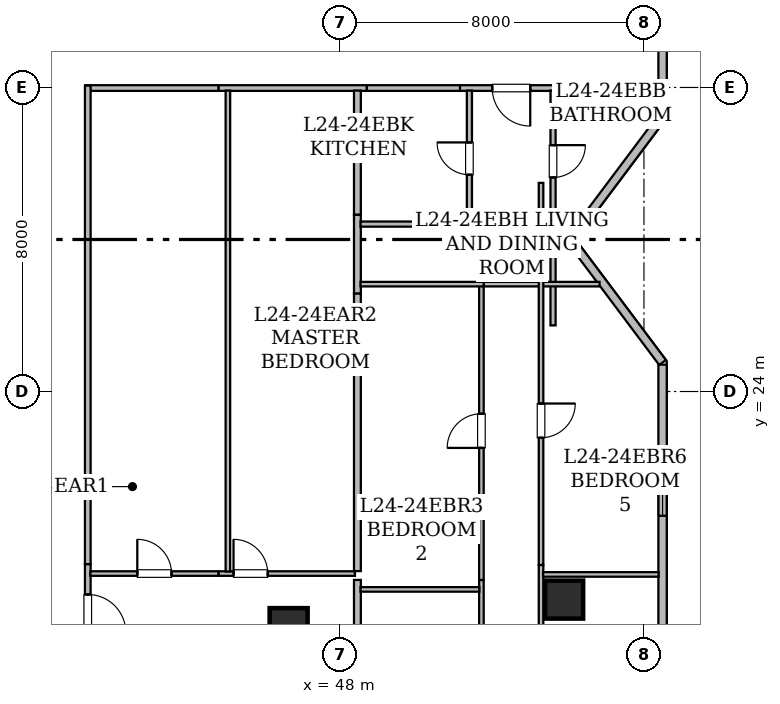
"""IFC4 building model, lengths in metres.
Left out: names, types, materials, properties, quantities, classifications, styles, units other than length and angle.
Written with IfcOpenShell. Run it as: python <this file> out.ifc"""

import sys

from ifc_helpers import new_model, si_unit, direction, frame, frame_2d, origin, origin_2d, place, context, subcontext, project, spatial, rectangle, hollow_rectangle, extrude, element, fill, save


model = new_model("IFC4")
c1 = context("Model", 3, precision=1e-05, world=origin(), true_north=direction((0.0, 1.0)))
c2 = subcontext(c1, "Body", "Model", "MODEL_VIEW")
j1 = project(units=[si_unit("LENGTHUNIT", "METRE"), si_unit("PLANEANGLEUNIT", "RADIAN")], contexts=[c1])
p1 = place(None, origin())
s1 = spatial("IfcSite", under=j1, at=p1, CompositionType="ELEMENT")
p2 = place(p1, origin())
s2 = spatial("IfcBuilding", under=s1, at=p2, CompositionType="ELEMENT")
p3 = place(p2, frame((0.0, 0.0, 98.25)))
s3 = spatial("IfcBuildingStorey", under=s2, at=p3, CompositionType="ELEMENT", Elevation=98.25)
for number, where, z_axis, x_axis in (
    (1, (53.9, 18.525, 0.0), (0.0, 0.0, 1.0), (1.0, 0.0, 0.0)),
    (2, (46.65, 17.8, 0.0), (0.0, 0.0, 1.0), (1.0, 0.0, 0.0)),
):
    element("IfcColumn", number, at=place(p3, frame(where, z_axis=z_axis, x_axis=x_axis)), inside=s3, PredefinedType="COLUMN", context=c2, shape_type="SweptSolid", body=[
        extrude(hollow_rectangle(XDim=1.0, YDim=1.0, WallThickness=0.05, at=origin_2d()), origin(), (0.0, 0.0, 1.0), 3.65),
    ])
p4 = place(p3, frame((56.49, 45.283, 0.0), z_axis=(0.0, 0.0, 1.0), x_axis=(0.0, -1.0, 0.0)))
e3 = element("IfcWall", 3, at=p4, inside=s3, PredefinedType="STANDARD", context=c2, shape_type="SweptSolid", body=[
    extrude(rectangle(XDim=14.046, YDim=0.22, at=frame_2d((7.023, 0.0))), origin(), (0.0, 0.0, 1.0), 3.43),
])
p5 = place(p4, frame((6.429, 0.0, 0.8)))
e4 = element("IfcOpeningElement", 4, at=p5, cuts=e3, PredefinedType="OPENING", context=c2, shape_type="SweptSolid", body=[
    extrude(rectangle(XDim=1.2, YDim=1.5, at=frame_2d((0.6, 0.75))), frame((0.0, 0.12, 0.0), z_axis=(0.0, -1.0, 0.0), x_axis=(1.0, 0.0, 0.0)), (0.0, 0.0, 1.0), 0.24),
])
p6 = place(p4, frame((2.971, 0.0, 0.85)))
e5 = element("IfcOpeningElement", 5, at=p6, cuts=e3, PredefinedType="OPENING", context=c2, shape_type="SweptSolid", body=[
    extrude(rectangle(XDim=1.65, YDim=1.55, at=frame_2d((0.825, 0.775))), frame((0.0, 0.12, 0.0), z_axis=(0.0, -1.0, 0.0), x_axis=(1.0, 0.0, 0.0)), (0.0, 0.0, 1.0), 0.24),
])
p7 = place(p3, frame((56.456, 31.191, 0.0), z_axis=(0.0, 0.0, 1.0), x_axis=(-0.600137081448, -0.799897170561, 0.0)))
e6 = element("IfcWall", 6, at=p7, inside=s3, PredefinedType="STANDARD", context=c2, shape_type="SweptSolid", body=[
    extrude(rectangle(XDim=3.989, YDim=0.22, at=frame_2d((1.995, 0.0))), origin(), (0.0, 0.0, 1.0), 3.43),
])
p8 = place(p3, frame((54.119, 27.924, 0.0), z_axis=(0.0, 0.0, 1.0), x_axis=(0.600039540588, -0.799970343032, 0.0)))
e7 = element("IfcWall", 7, at=p8, inside=s3, PredefinedType="STANDARD", context=c2, shape_type="SweptSolid", body=[
    extrude(rectangle(XDim=3.952, YDim=0.22, at=frame_2d((1.976, 0.0))), origin(), (0.0, 0.0, 1.0), 3.43),
])
p9 = place(p3, frame((56.49, 24.707, 0.0), z_axis=(0.0, 0.0, 1.0), x_axis=(0.0, -1.0, 0.0)))
e8 = element("IfcWall", 8, at=p9, inside=s3, PredefinedType="STANDARD", context=c2, shape_type="SweptSolid", body=[
    extrude(rectangle(XDim=14.061, YDim=0.22, at=frame_2d((7.031, 0.0))), origin(), (0.0, 0.0, 1.0), 3.43),
])
p10 = place(p9, frame((12.356, 0.0, 0.85)))
e9 = element("IfcOpeningElement", 9, at=p10, cuts=e8, PredefinedType="OPENING", context=c2, shape_type="SweptSolid", body=[
    extrude(rectangle(XDim=1.5, YDim=1.6, at=frame_2d((0.75, 0.8))), frame((0.0, 0.12, 0.0), z_axis=(0.0, -1.0, 0.0), x_axis=(1.0, 0.0, 0.0)), (0.0, 0.0, 1.0), 0.24),
])
p11 = place(p9, frame((7.902, 0.0, 0.85)))
e10 = element("IfcOpeningElement", 10, at=p11, cuts=e8, PredefinedType="OPENING", context=c2, shape_type="SweptSolid", body=[
    extrude(rectangle(XDim=1.65, YDim=1.55, at=frame_2d((0.825, 0.775))), frame((0.0, 0.12, 0.0), z_axis=(0.0, -1.0, 0.0), x_axis=(1.0, 0.0, 0.0)), (0.0, 0.0, 1.0), 0.24),
])
p12 = place(p9, frame((2.327, 0.0, 0.85)))
e11 = element("IfcOpeningElement", 11, at=p12, cuts=e8, PredefinedType="OPENING", context=c2, shape_type="SweptSolid", body=[
    extrude(rectangle(XDim=1.65, YDim=1.55, at=frame_2d((0.825, 0.775))), frame((0.0, 0.12, 0.0), z_axis=(0.0, -1.0, 0.0), x_axis=(1.0, 0.0, 0.0)), (0.0, 0.0, 1.0), 0.24),
])
p13 = place(p3, frame((41.365, 19.459, 0.0), z_axis=(0.0, 0.0, 1.0), x_axis=(0.0, -1.0, 0.0)))
e12 = element("IfcWall", 12, at=p13, inside=s3, PredefinedType="STANDARD", context=c2, shape_type="SweptSolid", body=[
    extrude(rectangle(XDim=2.559, YDim=0.15, at=frame_2d((1.28, 0.0))), origin(), (0.0, 0.0, 1.0), 2.647),
])
p14 = place(p13, frame((0.8, 0.0, 0.0)))
e13 = element("IfcOpeningElement", 13, at=p14, cuts=e12, PredefinedType="OPENING", context=c2, shape_type="SweptSolid", body=[
    extrude(rectangle(XDim=1.0, YDim=2.15, at=frame_2d((0.5, 1.075))), frame((0.0, 0.085, 0.0), z_axis=(0.0, -1.0, 0.0), x_axis=(1.0, 0.0, 0.0)), (0.0, 0.0, 1.0), 0.17),
])
p15 = place(p3, frame((48.709, 31.985, 0.0), z_axis=(0.0, 0.0, 1.0), x_axis=(-1.0, 0.0, 0.0)))
e14 = element("IfcWall", 14, at=p15, inside=s3, PredefinedType="STANDARD", context=c2, shape_type="SweptSolid", body=[
    extrude(rectangle(XDim=3.906, YDim=0.15, at=frame_2d((1.953, 0.0))), origin(), (0.0, 0.0, 1.0), 2.647),
])
p16 = place(p3, frame((44.803, 31.985, 0.0), z_axis=(0.0, 0.0, 1.0), x_axis=(-1.0, 0.0, 0.0)))
e15 = element("IfcWall", 15, at=p16, inside=s3, PredefinedType="STANDARD", context=c2, shape_type="SweptSolid", body=[
    extrude(rectangle(XDim=3.503, YDim=0.15, at=frame_2d((1.751, 0.0))), origin(), (0.0, 0.0, 1.0), 3.43),
])
p17 = place(p3, frame((41.365, 32.048, 0.0), z_axis=(0.0, 0.0, 1.0), x_axis=(0.0, -1.0, 0.0)))
e16 = element("IfcWall", 16, at=p17, inside=s3, PredefinedType="STANDARD", context=c2, shape_type="SweptSolid", body=[
    extrude(rectangle(XDim=12.589, YDim=0.15, at=frame_2d((6.294, 0.0))), origin(), (0.0, 0.0, 1.0), 2.961),
])
p18 = place(p3, frame((53.857, 31.985, 0.0), z_axis=(0.0, 0.0, 1.0), x_axis=(-1.0, 0.0, 0.0)))
e17 = element("IfcWall", 17, at=p18, inside=s3, PredefinedType="STANDARD", context=c2, shape_type="SweptSolid", body=[
    extrude(rectangle(XDim=2.699, YDim=0.15, at=frame_2d((1.35, 0.0))), origin(), (0.0, 0.0, 1.0), 2.876),
])
p19 = place(p18, frame((0.849, 0.0, 0.0)))
e18 = element("IfcOpeningElement", 18, at=p19, cuts=e17, PredefinedType="OPENING", context=c2, shape_type="SweptSolid", body=[
    extrude(rectangle(XDim=1.0, YDim=2.15, at=frame_2d((0.5, 1.075))), frame((0.0, 0.085, 0.0), z_axis=(0.0, -1.0, 0.0), x_axis=(1.0, 0.0, 0.0)), (0.0, 0.0, 1.0), 0.17),
])
p20 = place(p3, frame((56.388, 31.985, 0.0), z_axis=(0.0, 0.0, 1.0), x_axis=(-1.0, 0.0, 0.0)))
e19 = element("IfcWall", 19, at=p20, inside=s3, PredefinedType="STANDARD", context=c2, shape_type="SweptSolid", body=[
    extrude(rectangle(XDim=2.531, YDim=0.15, at=frame_2d((1.266, 0.0))), origin(), (0.0, 0.0, 1.0), 2.876),
])
p21 = place(p3, frame((51.158, 31.985, 0.0), z_axis=(0.0, 0.0, 1.0), x_axis=(-1.0, 0.0, 0.0)))
e20 = element("IfcWall", 20, at=p21, inside=s3, PredefinedType="STANDARD", context=c2, shape_type="SweptSolid", body=[
    extrude(rectangle(XDim=2.449, YDim=0.15, at=frame_2d((1.225, 0.0))), origin(), (0.0, 0.0, 1.0), 3.43),
])
p22 = place(p3, frame((44.803, 19.21, 0.0), z_axis=(0.0, 0.0, 1.0), x_axis=(1.0, 0.0, 0.0)))
e21 = element("IfcWall", 21, at=p22, inside=s3, PredefinedType="PARTITIONING", context=c2, shape_type="SweptSolid", body=[
    extrude(rectangle(XDim=3.592, YDim=0.12, at=frame_2d((1.796, 0.0))), origin(), (0.0, 0.0, 1.0), 2.647),
])
p23 = place(p22, frame((0.397, 0.0, 0.0)))
e22 = element("IfcOpeningElement", 22, at=p23, cuts=e21, PredefinedType="OPENING", context=c2, shape_type="SweptSolid", body=[
    extrude(rectangle(XDim=0.9, YDim=2.1, at=frame_2d((0.45, 1.05))), frame((0.0, 0.07, 0.0), z_axis=(0.0, -1.0, 0.0), x_axis=(1.0, 0.0, 0.0)), (0.0, 0.0, 1.0), 0.14),
])
p24 = place(p3, frame((41.432, 19.21, 0.0), z_axis=(0.0, 0.0, 1.0), x_axis=(1.0, 0.0, 0.0)))
e23 = element("IfcWall", 23, at=p24, inside=s3, PredefinedType="PARTITIONING", context=c2, shape_type="SweptSolid", body=[
    extrude(rectangle(XDim=3.371, YDim=0.12, at=frame_2d((1.686, 0.0))), origin(), (0.0, 0.0, 1.0), 3.43),
])
p25 = place(p24, frame((1.236, 0.0, 0.0)))
e24 = element("IfcOpeningElement", 24, at=p25, cuts=e23, PredefinedType="OPENING", context=c2, shape_type="SweptSolid", body=[
    extrude(rectangle(XDim=0.9, YDim=2.1, at=frame_2d((0.45, 1.05))), frame((0.0, 0.07, 0.0), z_axis=(0.0, -1.0, 0.0), x_axis=(1.0, 0.0, 0.0)), (0.0, 0.0, 1.0), 0.14),
])
p26 = place(p3, frame((48.46, 19.042, 0.0), z_axis=(0.0, 0.0, 1.0), x_axis=(0.0, -1.0, 0.0)))
e25 = element("IfcWall", 25, at=p26, inside=s3, PredefinedType="STANDARD", context=c2, shape_type="SweptSolid", body=[
    extrude(rectangle(XDim=6.75, YDim=0.18, at=frame_2d((3.375, 0.0))), origin(), (0.0, 0.0, 1.0), 2.647),
])
p27 = place(p3, frame((45.052, 19.264, 0.0), z_axis=(0.0, 0.0, 1.0), x_axis=(0.0, 1.0, 0.0)))
e26 = element("IfcWall", 26, at=p27, inside=s3, PredefinedType="PARTITIONING", context=c2, shape_type="SweptSolid", body=[
    extrude(rectangle(XDim=12.654, YDim=0.12, at=frame_2d((6.327, 0.0))), origin(), (0.0, 0.0, 1.0), 2.961),
])
p28 = place(p3, frame((48.46, 28.654, 0.0), z_axis=(0.0, 0.0, 1.0), x_axis=(0.0, -1.0, 0.0)))
e27 = element("IfcWall", 27, at=p28, inside=s3, PredefinedType="STANDARD", context=c2, shape_type="SweptSolid", body=[
    extrude(rectangle(XDim=2.078, YDim=0.18, at=frame_2d((1.039, 0.0))), origin(), (0.0, 0.0, 1.0), 3.43),
])
p29 = place(p3, frame((48.46, 31.918, 0.0), z_axis=(0.0, 0.0, 1.0), x_axis=(0.0, -1.0, 0.0)))
e28 = element("IfcWall", 28, at=p29, inside=s3, PredefinedType="STANDARD", context=c2, shape_type="SweptSolid", body=[
    extrude(rectangle(XDim=3.264, YDim=0.18, at=frame_2d((1.632, 0.0))), origin(), (0.0, 0.0, 1.0), 3.43),
])
p30 = place(p3, frame((48.46, 26.576, 0.0), z_axis=(0.0, 0.0, 1.0), x_axis=(0.0, -1.0, 0.0)))
e29 = element("IfcWall", 29, at=p30, inside=s3, PredefinedType="STANDARD", context=c2, shape_type="SweptSolid", body=[
    extrude(rectangle(XDim=7.301, YDim=0.18, at=frame_2d((3.65, 0.0))), origin(), (0.0, 0.0, 1.0), 2.687),
])
p31 = place(p3, frame((53.608, 31.918, 0.0), z_axis=(0.0, 0.0, 1.0), x_axis=(0.0, -1.0, 0.0)))
e30 = element("IfcWall", 30, at=p31, inside=s3, PredefinedType="PARTITIONING", context=c2, shape_type="SweptSolid", body=[
    extrude(rectangle(XDim=6.178, YDim=0.135, at=frame_2d((3.089, 0.0))), origin(), (0.0, 0.0, 1.0), 2.876),
])
p32 = place(p31, frame((1.435, 0.0, 0.0)))
e31 = element("IfcOpeningElement", 31, at=p32, cuts=e30, PredefinedType="OPENING", context=c2, shape_type="SweptSolid", body=[
    extrude(rectangle(XDim=0.85, YDim=2.1, at=frame_2d((0.425, 1.05))), frame((0.0, 0.077, 0.0), z_axis=(0.0, -1.0, 0.0), x_axis=(1.0, 0.0, 0.0)), (0.0, 0.0, 1.0), 0.155),
])
p33 = place(p3, frame((50.943, 28.405, 0.0), z_axis=(0.0, 0.0, 1.0), x_axis=(1.0, 0.0, 0.0)))
e32 = element("IfcWall", 32, at=p33, inside=s3, PredefinedType="PARTITIONING", context=c2, shape_type="SweptSolid", body=[
    extrude(rectangle(XDim=3.311, YDim=0.135, at=frame_2d((1.655, 0.0))), origin(), (0.0, 0.0, 1.0), 2.876),
])
p34 = place(p3, frame((48.542, 28.405, 0.0), z_axis=(0.0, 0.0, 1.0), x_axis=(1.0, 0.0, 0.0)))
e33 = element("IfcWall", 33, at=p34, inside=s3, PredefinedType="PARTITIONING", context=c2, shape_type="SweptSolid", body=[
    extrude(rectangle(XDim=2.401, YDim=0.135, at=frame_2d((1.201, 0.0))), origin(), (0.0, 0.0, 1.0), 3.43),
])
p35 = place(p3, frame((51.407, 28.34, 0.0), z_axis=(0.0, 0.0, 1.0), x_axis=(0.0, 1.0, 0.0)))
e34 = element("IfcWall", 34, at=p35, inside=s3, PredefinedType="PARTITIONING", context=c2, shape_type="SweptSolid", body=[
    extrude(rectangle(XDim=3.578, YDim=0.135, at=frame_2d((1.789, 0.0))), origin(), (0.0, 0.0, 1.0), 3.43),
])
p36 = place(p35, frame((1.364, 0.0, 0.0)))
e35 = element("IfcOpeningElement", 35, at=p36, cuts=e34, PredefinedType="OPENING", context=c2, shape_type="SweptSolid", body=[
    extrude(rectangle(XDim=0.85, YDim=2.1, at=frame_2d((0.425, 1.05))), frame((0.0, 0.077, 0.0), z_axis=(0.0, -1.0, 0.0), x_axis=(1.0, 0.0, 0.0)), (0.0, 0.0, 1.0), 0.155),
])
p37 = place(p3, frame((51.723, 12.292, 0.0), z_axis=(0.0, 0.0, 1.0), x_axis=(0.0, 1.0, 0.0)))
e36 = element("IfcWall", 36, at=p37, inside=s3, PredefinedType="PARTITIONING", context=c2, shape_type="SweptSolid", body=[
    extrude(rectangle(XDim=6.75, YDim=0.12, at=frame_2d((3.375, 0.0))), origin(), (0.0, 0.0, 1.0), 2.687),
])
p38 = place(p37, frame((2.904, 0.0, 0.0)))
e37 = element("IfcOpeningElement", 37, at=p38, cuts=e36, PredefinedType="OPENING", context=c2, shape_type="SweptSolid", body=[
    extrude(rectangle(XDim=0.9, YDim=2.1, at=frame_2d((0.45, 1.05))), frame((0.0, 0.07, 0.0), z_axis=(0.0, -1.0, 0.0), x_axis=(1.0, 0.0, 0.0)), (0.0, 0.0, 1.0), 0.14),
])
p39 = place(p3, frame((51.723, 19.042, 0.0), z_axis=(0.0, 0.0, 1.0), x_axis=(0.0, 1.0, 0.0)))
e38 = element("IfcWall", 38, at=p39, inside=s3, PredefinedType="PARTITIONING", context=c2, shape_type="SweptSolid", body=[
    extrude(rectangle(XDim=7.848, YDim=0.12, at=frame_2d((3.924, 0.0))), origin(), (0.0, 0.0, 1.0), 2.687),
])
p40 = place(p39, frame((3.474, 0.0, 0.0)))
e39 = element("IfcOpeningElement", 39, at=p40, cuts=e38, PredefinedType="OPENING", context=c2, shape_type="SweptSolid", body=[
    extrude(rectangle(XDim=0.9, YDim=2.1, at=frame_2d((0.45, 1.05))), frame((0.0, 0.07, 0.0), z_axis=(0.0, -1.0, 0.0), x_axis=(1.0, 0.0, 0.0)), (0.0, 0.0, 1.0), 0.14),
])
p41 = place(p3, frame((51.788, 26.825, 0.0), z_axis=(0.0, 0.0, 1.0), x_axis=(-1.0, 0.0, 0.0)))
e40 = element("IfcWall", 40, at=p41, inside=s3, PredefinedType="PARTITIONING", context=c2, shape_type="SweptSolid", body=[
    extrude(rectangle(XDim=3.246, YDim=0.12, at=frame_2d((1.623, 0.0))), origin(), (0.0, 0.0, 1.0), 3.43),
])
p42 = place(p3, frame((53.292, 19.437, 0.0), z_axis=(0.0, 0.0, 1.0), x_axis=(0.0, -1.0, 0.0)))
e41 = element("IfcWall", 41, at=p42, inside=s3, PredefinedType="PARTITIONING", context=c2, shape_type="SweptSolid", body=[
    extrude(rectangle(XDim=6.416, YDim=0.12, at=frame_2d((3.208, 0.0))), origin(), (0.0, 0.0, 1.0), 2.687),
])
p43 = place(p42, frame((2.78, 0.0, 0.0)))
e42 = element("IfcOpeningElement", 42, at=p43, cuts=e41, PredefinedType="OPENING", context=c2, shape_type="SweptSolid", body=[
    extrude(rectangle(XDim=0.9, YDim=2.1, at=frame_2d((0.45, 1.05))), frame((0.0, 0.07, 0.0), z_axis=(0.0, -1.0, 0.0), x_axis=(1.0, 0.0, 0.0)), (0.0, 0.0, 1.0), 0.14),
])
p44 = place(p3, frame((54.832, 26.825, 0.0), z_axis=(0.0, 0.0, 1.0), x_axis=(-1.0, 0.0, 0.0)))
e43 = element("IfcWall", 43, at=p44, inside=s3, PredefinedType="PARTITIONING", context=c2, shape_type="SweptSolid", body=[
    extrude(rectangle(XDim=3.044, YDim=0.12, at=frame_2d((1.522, 0.0))), origin(), (0.0, 0.0, 1.0), 2.876),
])
p45 = place(p3, frame((53.292, 29.49, 0.0), z_axis=(0.0, 0.0, 1.0), x_axis=(0.0, -1.0, 0.0)))
e44 = element("IfcWall", 44, at=p45, inside=s3, PredefinedType="PARTITIONING", context=c2, shape_type="SweptSolid", body=[
    extrude(rectangle(XDim=10.053, YDim=0.12, at=frame_2d((5.026, 0.0))), origin(), (0.0, 0.0, 1.0), 2.687),
])
p46 = place(p45, frame((5.806, 0.0, 0.0)))
e45 = element("IfcOpeningElement", 45, at=p46, cuts=e44, PredefinedType="OPENING", context=c2, shape_type="SweptSolid", body=[
    extrude(rectangle(XDim=0.9, YDim=2.1, at=frame_2d((0.45, 1.05))), frame((0.0, 0.07, 0.0), z_axis=(0.0, -1.0, 0.0), x_axis=(1.0, 0.0, 0.0)), (0.0, 0.0, 1.0), 0.14),
])
p47 = place(p3, frame((48.542, 18.793, 0.0), z_axis=(0.0, 0.0, 1.0), x_axis=(1.0, 0.0, 0.0)))
e46 = element("IfcWall", 46, at=p47, inside=s3, PredefinedType="PARTITIONING", context=c2, shape_type="SweptSolid", body=[
    extrude(rectangle(XDim=3.127, YDim=0.12, at=frame_2d((1.563, 0.0))), origin(), (0.0, 0.0, 1.0), 2.687),
])
p48 = place(p3, frame((53.346, 19.187, 0.0), z_axis=(0.0, 0.0, 1.0), x_axis=(1.0, 0.0, 0.0)))
e47 = element("IfcWall", 47, at=p48, inside=s3, PredefinedType="PARTITIONING", context=c2, shape_type="SweptSolid", body=[
    extrude(rectangle(XDim=3.042, YDim=0.12, at=frame_2d((1.521, 0.0))), origin(), (0.0, 0.0, 1.0), 2.876),
])
p49 = place(p12, origin())
e48 = element("IfcWindow", 48, at=p49, inside=s3, PartitioningType="SINGLE_PANEL", PredefinedType="WINDOW", context=c2, shape_type="SweptSolid", body=[
    extrude(rectangle(XDim=1.65, YDim=1.55, at=frame_2d((0.825, 0.775))), frame((0.0, 0.03, 0.0), z_axis=(0.0, -1.0, 0.0), x_axis=(1.0, 0.0, 0.0)), (0.0, 0.0, 1.0), 0.06),
])
fill(e11, e48)
p50 = place(p14, origin())
e49 = element("IfcDoor", 49, at=p50, inside=s3, OperationType="SINGLE_SWING_RIGHT", PredefinedType="DOOR", context=c2, shape_type="SweptSolid", body=[
    extrude(rectangle(XDim=1.0, YDim=2.15, at=frame_2d((0.5, 1.075))), frame((0.0, 0.025, 0.0), z_axis=(0.0, -1.0, 0.0), x_axis=(1.0, 0.0, 0.0)), (0.0, 0.0, 1.0), 0.05),
])
fill(e13, e49)
p51 = place(p19, origin())
e50 = element("IfcDoor", 50, at=p51, inside=s3, OperationType="SINGLE_SWING_LEFT", PredefinedType="DOOR", context=c2, shape_type="SweptSolid", body=[
    extrude(rectangle(XDim=1.0, YDim=2.15, at=frame_2d((0.5, 1.075))), frame((0.0, 0.025, 0.0), z_axis=(0.0, -1.0, 0.0), x_axis=(1.0, 0.0, 0.0)), (0.0, 0.0, 1.0), 0.05),
])
fill(e18, e50)
p52 = place(p23, origin())
e51 = element("IfcDoor", 51, at=p52, inside=s3, OperationType="SINGLE_SWING_LEFT", PredefinedType="DOOR", context=c2, shape_type="SweptSolid", body=[
    extrude(rectangle(XDim=0.9, YDim=2.1, at=frame_2d((0.45, 1.05))), frame((0.0, 0.025, 0.0), z_axis=(0.0, -1.0, 0.0), x_axis=(1.0, 0.0, 0.0)), (0.0, 0.0, 1.0), 0.05),
])
fill(e22, e51)
p53 = place(p25, origin())
e52 = element("IfcDoor", 52, at=p53, inside=s3, OperationType="SINGLE_SWING_LEFT", PredefinedType="DOOR", context=c2, shape_type="SweptSolid", body=[
    extrude(rectangle(XDim=0.9, YDim=2.1, at=frame_2d((0.45, 1.05))), frame((0.0, 0.025, 0.0), z_axis=(0.0, -1.0, 0.0), x_axis=(1.0, 0.0, 0.0)), (0.0, 0.0, 1.0), 0.05),
])
fill(e24, e52)
p54 = place(p32, origin())
e53 = element("IfcDoor", 53, at=p54, inside=s3, OperationType="SINGLE_SWING_LEFT", PredefinedType="DOOR", context=c2, shape_type="SweptSolid", body=[
    extrude(rectangle(XDim=0.85, YDim=2.1, at=frame_2d((0.425, 1.05))), frame((0.0, 0.025, 0.0), z_axis=(0.0, -1.0, 0.0), x_axis=(1.0, 0.0, 0.0)), (0.0, 0.0, 1.0), 0.05),
])
fill(e31, e53)
p55 = place(p36, origin())
e54 = element("IfcDoor", 54, at=p55, inside=s3, OperationType="SINGLE_SWING_RIGHT", PredefinedType="DOOR", context=c2, shape_type="SweptSolid", body=[
    extrude(rectangle(XDim=0.85, YDim=2.1, at=frame_2d((0.425, 1.05))), frame((0.0, 0.025, 0.0), z_axis=(0.0, -1.0, 0.0), x_axis=(1.0, 0.0, 0.0)), (0.0, 0.0, 1.0), 0.05),
])
fill(e35, e54)
p56 = place(p40, origin())
e55 = element("IfcDoor", 55, at=p56, inside=s3, OperationType="SINGLE_SWING_LEFT", PredefinedType="DOOR", context=c2, shape_type="SweptSolid", body=[
    extrude(rectangle(XDim=0.9, YDim=2.1, at=frame_2d((0.45, 1.05))), frame((0.0, 0.025, 0.0), z_axis=(0.0, -1.0, 0.0), x_axis=(1.0, 0.0, 0.0)), (0.0, 0.0, 1.0), 0.05),
])
fill(e39, e55)
p57 = place(p46, origin())
e56 = element("IfcDoor", 56, at=p57, inside=s3, OperationType="SINGLE_SWING_LEFT", PredefinedType="DOOR", context=c2, shape_type="SweptSolid", body=[
    extrude(rectangle(XDim=0.9, YDim=2.1, at=frame_2d((0.45, 1.05))), frame((0.0, 0.025, 0.0), z_axis=(0.0, -1.0, 0.0), x_axis=(1.0, 0.0, 0.0)), (0.0, 0.0, 1.0), 0.05),
])
fill(e45, e56)
save(model, sys.argv[1])
